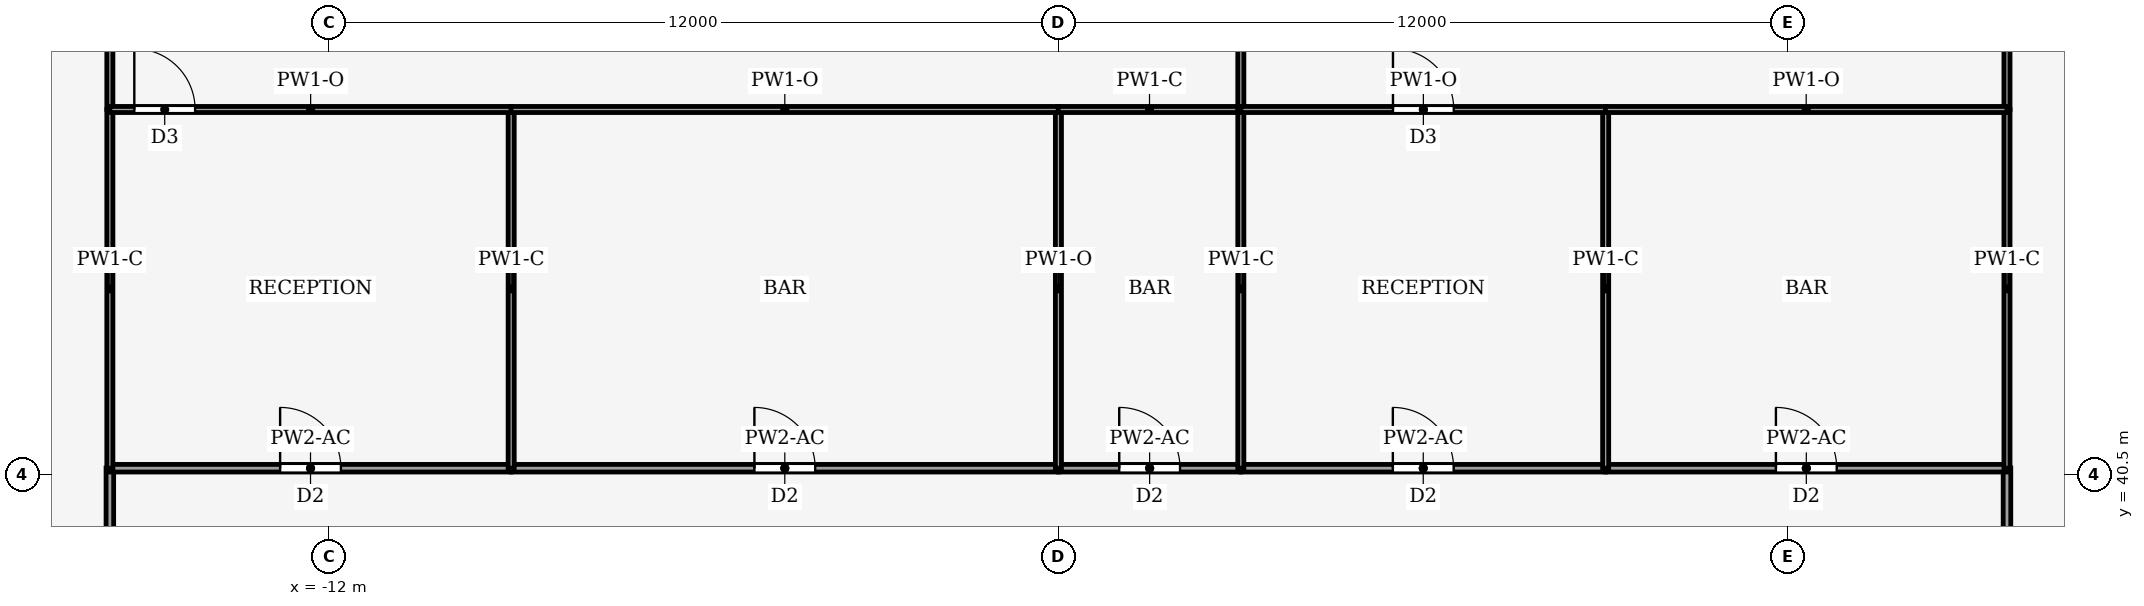
"""IFC4 building model, lengths in metres.
Left out: names, types, materials, properties, quantities, classifications, styles, units other than length and angle.
Written with IfcOpenShell. Run it as: python <this file> out.ifc"""

import sys

from ifc_helpers import new_model, si_unit, direction, frame, frame_2d, origin, place, context, subcontext, project, spatial, rectangle, extrude, element, fill, save


model = new_model("IFC4")
c1 = context("Model", 3, precision=1e-05, world=origin(), true_north=direction((0.0, 1.0)))
c2 = subcontext(c1, "Body", "Model", "MODEL_VIEW")
j1 = project(units=[si_unit("LENGTHUNIT", "METRE"), si_unit("PLANEANGLEUNIT", "RADIAN")], contexts=[c1])
p1 = place(None, origin())
s1 = spatial("IfcSite", under=j1, at=p1, CompositionType="ELEMENT")
p2 = place(p1, origin())
s2 = spatial("IfcBuilding", under=s1, at=p2, CompositionType="ELEMENT")
p3 = place(p2, frame((0.0, 0.0, 326.0)))
s3 = spatial("IfcBuildingStorey", under=s2, at=p3, CompositionType="ELEMENT", Elevation=326.0)
p4 = place(p3, frame((-15.6, 28.5, 0.0), z_axis=(0.0, 0.0, 1.0), x_axis=(0.0, 1.0, 0.0)))
e1 = element("IfcWall", 1, at=p4, inside=s3, PredefinedType="PARTITIONING", context=c2, shape_type="SweptSolid", body=[
    extrude(rectangle(XDim=12.104, YDim=0.125, at=frame_2d((6.052, 0.0))), origin(), (0.0, 0.0, 1.0), 3.14),
])
p5 = place(p4, frame((5.552, 0.0, 0.0)))
e2 = element("IfcOpeningElement", 2, at=p5, cuts=e1, PredefinedType="OPENING", context=c2, shape_type="SweptSolid", body=[
    extrude(rectangle(XDim=1.0, YDim=2.1, at=frame_2d((0.5, 1.05))), frame((0.0, 0.073, 0.0), z_axis=(0.0, -1.0, 0.0), x_axis=(1.0, 0.0, 0.0)), (0.0, 0.0, 1.0), 0.145),
])
p6 = place(p3, frame((15.6, 40.604, 0.0), z_axis=(0.0, 0.0, 1.0), x_axis=(0.0, -1.0, 0.0)))
e3 = element("IfcWall", 3, at=p6, inside=s3, PredefinedType="PARTITIONING", context=c2, shape_type="SweptSolid", body=[
    extrude(rectangle(XDim=6.104, YDim=0.125, at=frame_2d((3.052, 0.0))), origin(), (0.0, 0.0, 1.0), 3.14),
])
p7 = place(p6, frame((2.552, 0.0, 0.0)))
e4 = element("IfcOpeningElement", 4, at=p7, cuts=e3, PredefinedType="OPENING", context=c2, shape_type="SweptSolid", body=[
    extrude(rectangle(XDim=1.0, YDim=2.1, at=frame_2d((0.5, 1.05))), frame((0.0, 0.073, 0.0), z_axis=(0.0, -1.0, 0.0), x_axis=(1.0, 0.0, 0.0)), (0.0, 0.0, 1.0), 0.145),
])
p8 = place(p3, frame((-15.6, 40.6, 0.0), z_axis=(0.0, 0.0, 1.0), x_axis=(1.0, 0.0, 0.0)))
e5 = element("IfcWall", 5, at=p8, inside=s3, PredefinedType="PARTITIONING", context=c2, shape_type="SweptSolid", body=[
    extrude(rectangle(XDim=6.6, YDim=0.125, at=frame_2d((3.3, 0.0))), origin(), (0.0, 0.0, 1.0), 3.39),
])
p9 = place(p8, frame((2.8, 0.0, 0.0)))
e6 = element("IfcOpeningElement", 6, at=p9, cuts=e5, PredefinedType="OPENING", context=c2, shape_type="SweptSolid", body=[
    extrude(rectangle(XDim=1.0, YDim=2.1, at=frame_2d((0.5, 1.05))), frame((0.0, 0.073, 0.0), z_axis=(0.0, -1.0, 0.0), x_axis=(1.0, 0.0, 0.0)), (0.0, 0.0, 1.0), 0.145),
])
p10 = place(p3, frame((-9.0, 40.6, 0.0), z_axis=(0.0, 0.0, 1.0), x_axis=(1.0, 0.0, 0.0)))
e7 = element("IfcWall", 7, at=p10, inside=s3, PredefinedType="PARTITIONING", context=c2, shape_type="SweptSolid", body=[
    extrude(rectangle(XDim=9.0, YDim=0.125, at=frame_2d((4.5, 0.0))), origin(), (0.0, 0.0, 1.0), 3.39),
])
p11 = place(p10, frame((4.0, 0.0, 0.0)))
e8 = element("IfcOpeningElement", 8, at=p11, cuts=e7, PredefinedType="OPENING", context=c2, shape_type="SweptSolid", body=[
    extrude(rectangle(XDim=1.0, YDim=2.1, at=frame_2d((0.5, 1.05))), frame((0.0, 0.073, 0.0), z_axis=(0.0, -1.0, 0.0), x_axis=(1.0, 0.0, 0.0)), (0.0, 0.0, 1.0), 0.145),
])
p12 = place(p3, frame((0.0, 40.6, 0.0), z_axis=(0.0, 0.0, 1.0), x_axis=(1.0, 0.0, 0.0)))
e9 = element("IfcWall", 9, at=p12, inside=s3, PredefinedType="PARTITIONING", context=c2, shape_type="SweptSolid", body=[
    extrude(rectangle(XDim=3.0, YDim=0.125, at=frame_2d((1.5, 0.0))), origin(), (0.0, 0.0, 1.0), 3.39),
])
p13 = place(p12, frame((1.0, 0.0, 0.0)))
e10 = element("IfcOpeningElement", 10, at=p13, cuts=e9, PredefinedType="OPENING", context=c2, shape_type="SweptSolid", body=[
    extrude(rectangle(XDim=1.0, YDim=2.1, at=frame_2d((0.5, 1.05))), frame((0.0, 0.073, 0.0), z_axis=(0.0, -1.0, 0.0), x_axis=(1.0, 0.0, 0.0)), (0.0, 0.0, 1.0), 0.145),
])
p14 = place(p3, frame((3.0, 40.6, 0.0), z_axis=(0.0, 0.0, 1.0), x_axis=(1.0, 0.0, 0.0)))
e11 = element("IfcWall", 11, at=p14, inside=s3, PredefinedType="PARTITIONING", context=c2, shape_type="SweptSolid", body=[
    extrude(rectangle(XDim=6.0, YDim=0.125, at=frame_2d((3.0, 0.0))), origin(), (0.0, 0.0, 1.0), 3.39),
])
p15 = place(p14, frame((2.5, 0.0, 0.0)))
e12 = element("IfcOpeningElement", 12, at=p15, cuts=e11, PredefinedType="OPENING", context=c2, shape_type="SweptSolid", body=[
    extrude(rectangle(XDim=1.0, YDim=2.1, at=frame_2d((0.5, 1.05))), frame((0.0, 0.073, 0.0), z_axis=(0.0, -1.0, 0.0), x_axis=(1.0, 0.0, 0.0)), (0.0, 0.0, 1.0), 0.145),
])
p16 = place(p3, frame((9.0, 40.6, 0.0), z_axis=(0.0, 0.0, 1.0), x_axis=(1.0, 0.0, 0.0)))
e13 = element("IfcWall", 13, at=p16, inside=s3, PredefinedType="PARTITIONING", context=c2, shape_type="SweptSolid", body=[
    extrude(rectangle(XDim=6.6, YDim=0.125, at=frame_2d((3.3, 0.0))), origin(), (0.0, 0.0, 1.0), 3.39),
])
p17 = place(p16, frame((2.8, 0.0, 0.0)))
e14 = element("IfcOpeningElement", 14, at=p17, cuts=e13, PredefinedType="OPENING", context=c2, shape_type="SweptSolid", body=[
    extrude(rectangle(XDim=1.0, YDim=2.1, at=frame_2d((0.5, 1.05))), frame((0.0, 0.073, 0.0), z_axis=(0.0, -1.0, 0.0), x_axis=(1.0, 0.0, 0.0)), (0.0, 0.0, 1.0), 0.145),
])
p18 = place(p3, frame((-15.6, 40.6, 0.0), z_axis=(0.0, 0.0, 1.0), x_axis=(0.0, 1.0, 0.0)))
e15 = element("IfcWall", 15, at=p18, inside=s3, PredefinedType="PARTITIONING", context=c2, shape_type="SweptSolid", body=[
    extrude(rectangle(XDim=5.9, YDim=0.1, at=frame_2d((2.95, 0.0))), origin(), (0.0, 0.0, 1.0), 3.87),
])
p19 = place(p3, frame((-15.6, 46.5, 0.0), z_axis=(0.0, 0.0, 1.0), x_axis=(0.0, 1.0, 0.0)))
e16 = element("IfcWall", 16, at=p19, inside=s3, PredefinedType="PARTITIONING", context=c2, shape_type="SweptSolid", body=[
    extrude(rectangle(XDim=15.0, YDim=0.1, at=frame_2d((7.5, 0.0))), origin(), (0.0, 0.0, 1.0), 3.35),
])
p20 = place(p3, frame((15.6, 46.5, 0.0), z_axis=(0.0, 0.0, 1.0), x_axis=(0.0, -1.0, 0.0)))
e17 = element("IfcWall", 17, at=p20, inside=s3, PredefinedType="PARTITIONING", context=c2, shape_type="SweptSolid", body=[
    extrude(rectangle(XDim=5.9, YDim=0.1, at=frame_2d((2.95, 0.0))), origin(), (0.0, 0.0, 1.0), 3.87),
])
p21 = place(p3, frame((15.6, 61.5, 0.0), z_axis=(0.0, 0.0, 1.0), x_axis=(0.0, -1.0, 0.0)))
e18 = element("IfcWall", 18, at=p21, inside=s3, PredefinedType="PARTITIONING", context=c2, shape_type="SweptSolid", body=[
    extrude(rectangle(XDim=15.0, YDim=0.1, at=frame_2d((7.5, 0.0))), origin(), (0.0, 0.0, 1.0), 3.35),
])
p22 = place(p3, frame((-9.0, 40.6, 0.0), z_axis=(0.0, 0.0, 1.0), x_axis=(0.0, 1.0, 0.0)))
e19 = element("IfcWall", 19, at=p22, inside=s3, PredefinedType="PARTITIONING", context=c2, shape_type="SweptSolid", body=[
    extrude(rectangle(XDim=5.9, YDim=0.1, at=frame_2d((2.95, 0.0))), origin(), (0.0, 0.0, 1.0), 3.87),
])
p23 = place(p3, frame((-15.6, 46.5, 0.0), z_axis=(0.0, 0.0, 1.0), x_axis=(1.0, 0.0, 0.0)))
e20 = element("IfcWall", 20, at=p23, inside=s3, PredefinedType="PARTITIONING", context=c2, shape_type="SweptSolid", body=[
    extrude(rectangle(XDim=6.604, YDim=0.1, at=frame_2d((3.302, 0.0))), origin(), (0.0, 0.0, 1.0), 3.39),
])
p24 = place(p23, frame((0.402, 0.0, 0.0)))
e21 = element("IfcOpeningElement", 21, at=p24, cuts=e20, PredefinedType="OPENING", context=c2, shape_type="SweptSolid", body=[
    extrude(rectangle(XDim=1.0, YDim=2.1, at=frame_2d((0.5, 1.05))), frame((0.0, 0.06, 0.0), z_axis=(0.0, -1.0, 0.0), x_axis=(1.0, 0.0, 0.0)), (0.0, 0.0, 1.0), 0.12),
])
p25 = place(p3, frame((0.0, 40.6, 0.0), z_axis=(0.0, 0.0, 1.0), x_axis=(0.0, 1.0, 0.0)))
e22 = element("IfcWall", 22, at=p25, inside=s3, PredefinedType="PARTITIONING", context=c2, shape_type="SweptSolid", body=[
    extrude(rectangle(XDim=5.9, YDim=0.1, at=frame_2d((2.95, 0.0))), origin(), (0.0, 0.0, 1.0), 3.39),
])
p26 = place(p3, frame((0.004, 46.5, 0.0), z_axis=(0.0, 0.0, 1.0), x_axis=(-1.0, 0.0, 0.0)))
e23 = element("IfcWall", 23, at=p26, inside=s3, PredefinedType="PARTITIONING", context=c2, shape_type="SweptSolid", body=[
    extrude(rectangle(XDim=9.008, YDim=0.1, at=frame_2d((4.504, 0.0))), origin(), (0.0, 0.0, 1.0), 3.39),
])
p27 = place(p3, frame((3.0, 46.5, 0.0), z_axis=(0.0, 0.0, 1.0), x_axis=(-1.0, 0.0, 0.0)))
e24 = element("IfcWall", 24, at=p27, inside=s3, PredefinedType="PARTITIONING", context=c2, shape_type="SweptSolid", body=[
    extrude(rectangle(XDim=3.004, YDim=0.1, at=frame_2d((1.502, 0.0))), origin(), (0.0, 0.0, 1.0), 3.87),
])
p28 = place(p3, frame((3.0, 40.6, 0.0), z_axis=(0.0, 0.0, 1.0), x_axis=(0.0, 1.0, 0.0)))
e25 = element("IfcWall", 25, at=p28, inside=s3, PredefinedType="PARTITIONING", context=c2, shape_type="SweptSolid", body=[
    extrude(rectangle(XDim=5.9, YDim=0.1, at=frame_2d((2.95, 0.0))), origin(), (0.0, 0.0, 1.0), 3.87),
])
p29 = place(p3, frame((3.0, 46.5, 0.0), z_axis=(0.0, 0.0, 1.0), x_axis=(0.0, 1.0, 0.0)))
e26 = element("IfcWall", 26, at=p29, inside=s3, PredefinedType="PARTITIONING", context=c2, shape_type="SweptSolid", body=[
    extrude(rectangle(XDim=15.0, YDim=0.1, at=frame_2d((7.5, 0.0))), origin(), (0.0, 0.0, 1.0), 3.24),
])
p30 = place(p3, frame((9.0, 40.6, 0.0), z_axis=(0.0, 0.0, 1.0), x_axis=(0.0, 1.0, 0.0)))
e27 = element("IfcWall", 27, at=p30, inside=s3, PredefinedType="PARTITIONING", context=c2, shape_type="SweptSolid", body=[
    extrude(rectangle(XDim=5.9, YDim=0.1, at=frame_2d((2.95, 0.0))), origin(), (0.0, 0.0, 1.0), 3.87),
])
p31 = place(p3, frame((3.0, 46.5, 0.0), z_axis=(0.0, 0.0, 1.0), x_axis=(1.0, 0.0, 0.0)))
e28 = element("IfcWall", 28, at=p31, inside=s3, PredefinedType="PARTITIONING", context=c2, shape_type="SweptSolid", body=[
    extrude(rectangle(XDim=6.004, YDim=0.1, at=frame_2d((3.002, 0.0))), origin(), (0.0, 0.0, 1.0), 3.39),
])
p32 = place(p31, frame((2.502, 0.0, 0.0)))
e29 = element("IfcOpeningElement", 29, at=p32, cuts=e28, PredefinedType="OPENING", context=c2, shape_type="SweptSolid", body=[
    extrude(rectangle(XDim=1.0, YDim=2.1, at=frame_2d((0.5, 1.05))), frame((0.0, 0.06, 0.0), z_axis=(0.0, -1.0, 0.0), x_axis=(1.0, 0.0, 0.0)), (0.0, 0.0, 1.0), 0.12),
])
p33 = place(p3, frame((15.6, 46.5, 0.0), z_axis=(0.0, 0.0, 1.0), x_axis=(-1.0, 0.0, 0.0)))
e30 = element("IfcWall", 30, at=p33, inside=s3, PredefinedType="PARTITIONING", context=c2, shape_type="SweptSolid", body=[
    extrude(rectangle(XDim=6.604, YDim=0.1, at=frame_2d((3.302, 0.0))), origin(), (0.0, 0.0, 1.0), 3.39),
])
p34 = place(p9, origin())
e31 = element("IfcDoor", 31, at=p34, inside=s3, OperationType="SINGLE_SWING_RIGHT", PredefinedType="DOOR", context=c2, shape_type="SweptSolid", body=[
    extrude(rectangle(XDim=1.0, YDim=2.1, at=frame_2d((0.5, 1.05))), frame((0.0, 0.025, 0.0), z_axis=(0.0, -1.0, 0.0), x_axis=(1.0, 0.0, 0.0)), (0.0, 0.0, 1.0), 0.05),
])
fill(e6, e31)
p35 = place(p11, origin())
e32 = element("IfcDoor", 32, at=p35, inside=s3, OperationType="SINGLE_SWING_LEFT", PredefinedType="DOOR", context=c2, shape_type="SweptSolid", body=[
    extrude(rectangle(XDim=1.0, YDim=2.1, at=frame_2d((0.5, 1.05))), frame((0.0, 0.025, 0.0), z_axis=(0.0, -1.0, 0.0), x_axis=(1.0, 0.0, 0.0)), (0.0, 0.0, 1.0), 0.05),
])
fill(e8, e32)
p36 = place(p13, origin())
e33 = element("IfcDoor", 33, at=p36, inside=s3, OperationType="SINGLE_SWING_RIGHT", PredefinedType="DOOR", context=c2, shape_type="SweptSolid", body=[
    extrude(rectangle(XDim=1.0, YDim=2.1, at=frame_2d((0.5, 1.05))), frame((0.0, 0.025, 0.0), z_axis=(0.0, -1.0, 0.0), x_axis=(1.0, 0.0, 0.0)), (0.0, 0.0, 1.0), 0.05),
])
fill(e10, e33)
p37 = place(p15, origin())
e34 = element("IfcDoor", 34, at=p37, inside=s3, OperationType="SINGLE_SWING_LEFT", PredefinedType="DOOR", context=c2, shape_type="SweptSolid", body=[
    extrude(rectangle(XDim=1.0, YDim=2.1, at=frame_2d((0.5, 1.05))), frame((0.0, 0.025, 0.0), z_axis=(0.0, -1.0, 0.0), x_axis=(1.0, 0.0, 0.0)), (0.0, 0.0, 1.0), 0.05),
])
fill(e12, e34)
p38 = place(p17, origin())
e35 = element("IfcDoor", 35, at=p38, inside=s3, OperationType="SINGLE_SWING_RIGHT", PredefinedType="DOOR", context=c2, shape_type="SweptSolid", body=[
    extrude(rectangle(XDim=1.0, YDim=2.1, at=frame_2d((0.5, 1.05))), frame((0.0, 0.025, 0.0), z_axis=(0.0, -1.0, 0.0), x_axis=(1.0, 0.0, 0.0)), (0.0, 0.0, 1.0), 0.05),
])
fill(e14, e35)
p39 = place(p24, origin())
e36 = element("IfcDoor", 36, at=p39, inside=s3, OperationType="SINGLE_SWING_LEFT", PredefinedType="DOOR", context=c2, shape_type="SweptSolid", body=[
    extrude(rectangle(XDim=1.0, YDim=2.1, at=frame_2d((0.5, 1.05))), frame((0.0, 0.025, 0.0), z_axis=(0.0, -1.0, 0.0), x_axis=(1.0, 0.0, 0.0)), (0.0, 0.0, 1.0), 0.05),
])
fill(e21, e36)
p40 = place(p32, origin())
e37 = element("IfcDoor", 37, at=p40, inside=s3, OperationType="SINGLE_SWING_LEFT", PredefinedType="DOOR", context=c2, shape_type="SweptSolid", body=[
    extrude(rectangle(XDim=1.0, YDim=2.1, at=frame_2d((0.5, 1.05))), frame((0.0, 0.025, 0.0), z_axis=(0.0, -1.0, 0.0), x_axis=(1.0, 0.0, 0.0)), (0.0, 0.0, 1.0), 0.05),
])
fill(e29, e37)
save(model, sys.argv[1])
